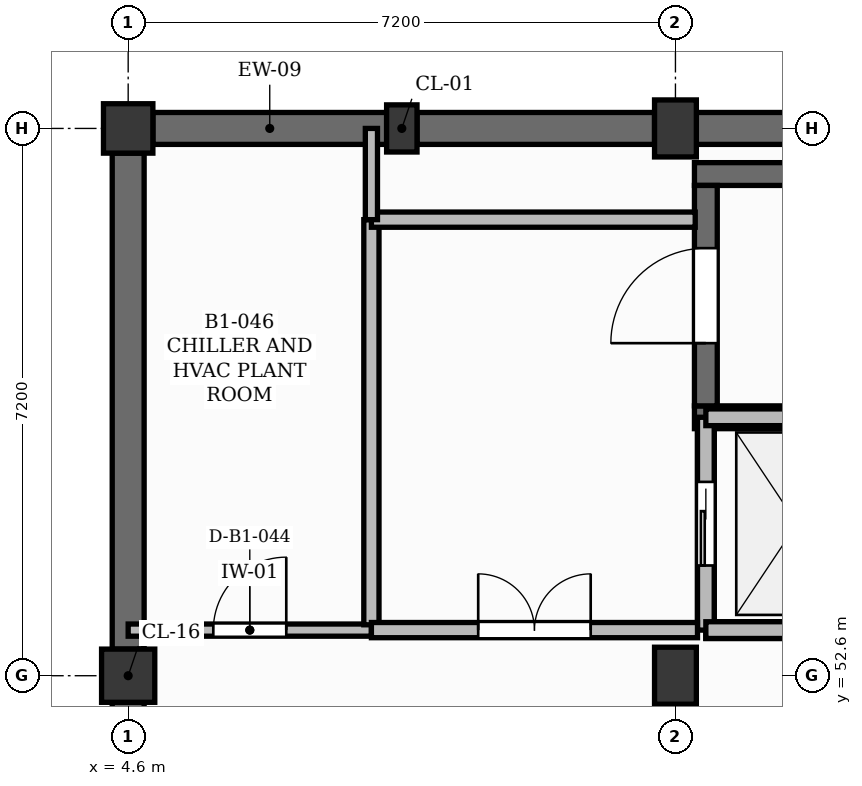
"""IFC4 building model, lengths in metres.
Left out: names, types, materials, properties, quantities, classifications, styles, units other than length and angle.
Written with IfcOpenShell. Run it as: python <this file> out.ifc"""

import sys

from ifc_helpers import new_model, si_unit, direction, frame, frame_2d, origin, origin_2d, place, context, subcontext, project, spatial, rectangle, extrude, element, fill, save


model = new_model("IFC4")
c1 = context("Model", 3, precision=1e-05, world=origin(), true_north=direction((0.0, 1.0)))
c2 = subcontext(c1, "Body", "Model", "MODEL_VIEW")
j1 = project(units=[si_unit("LENGTHUNIT", "METRE"), si_unit("PLANEANGLEUNIT", "RADIAN")], contexts=[c1])
p1 = place(None, origin())
s1 = spatial("IfcSite", under=j1, at=p1, CompositionType="ELEMENT")
p2 = place(p1, origin())
s2 = spatial("IfcBuilding", under=s1, at=p2, CompositionType="ELEMENT")
p3 = place(p2, frame((0.0, 0.0, -4.5)))
s3 = spatial("IfcBuildingStorey", under=s2, at=p3, CompositionType="ELEMENT", Elevation=-4.5)
p4 = place(p3, frame((4.6, 52.6, 0.0), z_axis=(0.0, 0.0, 1.0), x_axis=(1.0, 0.0, 0.0)))
e1 = element("IfcColumn", 1, at=p4, inside=s3, PredefinedType="COLUMN", context=c2, shape_type="SweptSolid", body=[
    extrude(rectangle(XDim=0.7, YDim=0.7, at=origin_2d()), origin(), (0.0, 0.0, 1.0), 4.2),
])
p5 = place(p3, frame((4.6, 59.8, 0.0), z_axis=(0.0, 0.0, 1.0), x_axis=(1.0, 0.0, 0.0)))
e2 = element("IfcColumn", 2, at=p5, inside=s3, PredefinedType="COLUMN", context=c2, shape_type="SweptSolid", body=[
    extrude(rectangle(XDim=0.65, YDim=0.65, at=origin_2d()), origin(), (0.0, 0.0, 1.0), 4.2),
])
for number, where, z_axis, x_axis in (
    (3, (11.8, 52.6, 0.0), (0.0, 0.0, 1.0), (1.0, 0.0, 0.0)),
    (4, (11.8, 59.8, 0.0), (0.0, 0.0, 1.0), (1.0, 0.0, 0.0)),
):
    element("IfcColumn", number, at=place(p3, frame(where, z_axis=z_axis, x_axis=x_axis)), inside=s3, PredefinedType="COLUMN", context=c2, shape_type="SweptSolid", body=[
        extrude(rectangle(XDim=0.55, YDim=0.75, at=origin_2d()), origin(), (0.0, 0.0, 1.0), 4.2),
    ])
p6 = place(p3, frame((8.2, 59.8, 0.0), z_axis=(0.0, 0.0, 1.0), x_axis=(1.0, 0.0, 0.0)))
e5 = element("IfcColumn", 5, at=p6, inside=s3, PredefinedType="PILASTER", context=c2, shape_type="SweptSolid", body=[
    extrude(rectangle(XDim=0.4, YDim=0.62, at=origin_2d()), origin(), (0.0, 0.0, 1.0), 4.2),
])
p7 = place(p3, frame((4.6, 45.725, 0.0), z_axis=(0.0, 0.0, 1.0), x_axis=(0.0, 1.0, 0.0)))
e6 = element("IfcWall", 6, at=p7, inside=s3, PredefinedType="USERDEFINED", context=c2, shape_type="SweptSolid", body=[
    extrude(rectangle(XDim=6.525, YDim=0.42, at=frame_2d((3.262, 0.0))), origin(), (0.0, 0.0, 1.0), 4.2),
])
p8 = place(p3, frame((4.925, 59.8, 0.0), z_axis=(0.0, 0.0, 1.0), x_axis=(1.0, 0.0, 0.0)))
e7 = element("IfcWall", 7, at=p8, inside=s3, PredefinedType="USERDEFINED", context=c2, shape_type="SweptSolid", body=[
    extrude(rectangle(XDim=3.075, YDim=0.42, at=frame_2d((1.538, 0.0))), origin(), (0.0, 0.0, 1.0), 4.2),
])
p9 = place(p3, frame((8.4, 59.8, 0.0), z_axis=(0.0, 0.0, 1.0), x_axis=(1.0, 0.0, 0.0)))
e8 = element("IfcWall", 8, at=p9, inside=s3, PredefinedType="USERDEFINED", context=c2, shape_type="SweptSolid", body=[
    extrude(rectangle(XDim=3.125, YDim=0.42, at=frame_2d((1.562, 0.0))), origin(), (0.0, 0.0, 1.0), 4.2),
])
p10 = place(p3, frame((4.6, 52.95, 0.0), z_axis=(0.0, 0.0, 1.0), x_axis=(0.0, 1.0, 0.0)))
e9 = element("IfcWall", 9, at=p10, inside=s3, PredefinedType="USERDEFINED", context=c2, shape_type="SweptSolid", body=[
    extrude(rectangle(XDim=6.525, YDim=0.42, at=frame_2d((3.263, 0.0))), origin(), (0.0, 0.0, 1.0), 4.2),
])
p11 = place(p3, frame((12.075, 59.8, 0.0), z_axis=(0.0, 0.0, 1.0), x_axis=(1.0, 0.0, 0.0)))
e10 = element("IfcWall", 10, at=p11, inside=s3, PredefinedType="USERDEFINED", context=c2, shape_type="SweptSolid", body=[
    extrude(rectangle(XDim=6.575, YDim=0.42, at=frame_2d((3.288, 0.0))), origin(), (0.0, 0.0, 1.0), 4.2),
])
for number, where, z_axis, x_axis in (
    (11, (12.05, 56.0, 0.0), (0.0, 0.0, 1.0), (1.0, 0.0, 0.0)),
    (12, (12.05, 59.2, 0.0), (0.0, 0.0, 1.0), (1.0, 0.0, 0.0)),
):
    element("IfcWall", number, at=place(p3, frame(where, z_axis=z_axis, x_axis=x_axis)), inside=s3, PredefinedType="SHEAR", context=c2, shape_type="SweptSolid", body=[
        extrude(rectangle(XDim=6.7, YDim=0.3, at=frame_2d((3.35, 0.0))), origin(), (0.0, 0.0, 1.0), 4.25),
    ])
p12 = place(p3, frame((12.2, 56.15, 0.0), z_axis=(0.0, 0.0, 1.0), x_axis=(0.0, 1.0, 0.0)))
e13 = element("IfcWall", 13, at=p12, inside=s3, PredefinedType="SHEAR", context=c2, shape_type="SweptSolid", body=[
    extrude(rectangle(XDim=2.9, YDim=0.3, at=frame_2d((1.45, 0.0))), origin(), (0.0, 0.0, 1.0), 4.25),
])
p13 = place(p12, frame((0.825, 0.0, 0.0)))
e14 = element("IfcOpeningElement", 14, at=p13, cuts=e13, PredefinedType="OPENING", context=c2, shape_type="SweptSolid", body=[
    extrude(rectangle(XDim=1.25, YDim=2.15, at=frame_2d((0.625, 1.075))), frame((0.0, 0.16, 0.0), z_axis=(0.0, -1.0, 0.0), x_axis=(1.0, 0.0, 0.0)), (0.0, 0.0, 1.0), 0.32),
])
p14 = place(p3, frame((12.2, 53.2, 0.0), z_axis=(0.0, 0.0, 1.0), x_axis=(1.0, 0.0, 0.0)))
e15 = element("IfcWall", 15, at=p14, inside=s3, PredefinedType="SOLIDWALL", context=c2, shape_type="SweptSolid", body=[
    extrude(rectangle(XDim=2.4, YDim=0.22, at=frame_2d((1.2, 0.0))), origin(), (0.0, 0.0, 1.0), 4.25),
])
p15 = place(p3, frame((12.2, 53.31, 0.0), z_axis=(0.0, 0.0, 1.0), x_axis=(0.0, 1.0, 0.0)))
e16 = element("IfcWall", 16, at=p15, inside=s3, PredefinedType="SOLIDWALL", context=c2, shape_type="SweptSolid", body=[
    extrude(rectangle(XDim=2.58, YDim=0.22, at=frame_2d((1.29, 0.0))), origin(), (0.0, 0.0, 1.0), 4.25),
])
p16 = place(p15, frame((0.74, 0.0, 0.0)))
e17 = element("IfcOpeningElement", 17, at=p16, cuts=e16, PredefinedType="OPENING", context=c2, shape_type="SweptSolid", body=[
    extrude(rectangle(XDim=1.1, YDim=2.15, at=frame_2d((0.55, 1.075))), frame((0.0, 0.12, 0.0), z_axis=(0.0, -1.0, 0.0), x_axis=(1.0, 0.0, 0.0)), (0.0, 0.0, 1.0), 0.24),
])
p17 = place(p3, frame((12.2, 53.2, -0.9), z_axis=(0.0, 0.0, 1.0), x_axis=(0.0, 1.0, 0.0)))
e18 = element("IfcWall", 18, at=p17, inside=s3, PredefinedType="SOLIDWALL", context=c2, shape_type="SweptSolid", body=[
    extrude(rectangle(XDim=2.8, YDim=0.22, at=frame_2d((1.4, 0.0))), origin(), (0.0, 0.0, 1.0), 0.9),
])
for number, where, z_axis, x_axis in (
    (19, (12.2, 53.2, -0.9), (0.0, 0.0, 1.0), (1.0, 0.0, 0.0)),
    (20, (12.2, 56.0, -0.9), (0.0, 0.0, 1.0), (1.0, 0.0, 0.0)),
):
    element("IfcWall", number, at=place(p3, frame(where, z_axis=z_axis, x_axis=x_axis)), inside=s3, PredefinedType="SOLIDWALL", context=c2, shape_type="SweptSolid", body=[
        extrude(rectangle(XDim=2.4, YDim=0.22, at=frame_2d((1.2, 0.0))), origin(), (0.0, 0.0, 1.0), 0.9),
    ])
p18 = place(p3, frame((4.6, 53.2, 0.0), z_axis=(0.0, 0.0, 1.0), x_axis=(1.0, 0.0, 0.0)))
e21 = element("IfcWall", 21, at=p18, inside=s3, PredefinedType="PARTITIONING", context=c2, shape_type="SweptSolid", body=[
    extrude(rectangle(XDim=3.2, YDim=0.16, at=frame_2d((1.6, 0.0))), origin(), (0.0, 0.0, 1.0), 4.08),
])
p19 = place(p18, frame((1.12, 0.0, 0.0)))
e22 = element("IfcOpeningElement", 22, at=p19, cuts=e21, PredefinedType="OPENING", context=c2, shape_type="SweptSolid", body=[
    extrude(rectangle(XDim=0.96, YDim=2.1, at=frame_2d((0.48, 1.05))), frame((0.0, 0.09, 0.0), z_axis=(0.0, -1.0, 0.0), x_axis=(1.0, 0.0, 0.0)), (0.0, 0.0, 1.0), 0.18),
])
p20 = place(p3, frame((7.8, 53.27, 0.0), z_axis=(0.0, 0.0, 1.0), x_axis=(0.0, 1.0, 0.0)))
e23 = element("IfcWall", 23, at=p20, inside=s3, PredefinedType="PARTITIONING", context=c2, shape_type="SweptSolid", body=[
    extrude(rectangle(XDim=5.33, YDim=0.2, at=frame_2d((2.665, 0.0))), origin(), (0.0, 0.0, 1.0), 4.08),
])
p21 = place(p3, frame((7.8, 53.2, 0.0), z_axis=(0.0, 0.0, 1.0), x_axis=(1.0, 0.0, 0.0)))
e24 = element("IfcWall", 24, at=p21, inside=s3, PredefinedType="PARTITIONING", context=c2, shape_type="SweptSolid", body=[
    extrude(rectangle(XDim=4.29, YDim=0.2, at=frame_2d((2.145, 0.0))), origin(), (0.0, 0.0, 1.0), 4.08),
])
p22 = place(p21, frame((1.405, 0.0, 0.0)))
e25 = element("IfcOpeningElement", 25, at=p22, cuts=e24, PredefinedType="OPENING", context=c2, shape_type="SweptSolid", body=[
    extrude(rectangle(XDim=1.48, YDim=2.25, at=frame_2d((0.74, 1.125))), frame((0.0, 0.11, 0.0), z_axis=(0.0, -1.0, 0.0), x_axis=(1.0, 0.0, 0.0)), (0.0, 0.0, 1.0), 0.22),
])
p23 = place(p3, frame((12.06, 58.6, 0.0), z_axis=(0.0, 0.0, 1.0), x_axis=(-1.0, 0.0, 0.0)))
e26 = element("IfcWall", 26, at=p23, inside=s3, PredefinedType="PARTITIONING", context=c2, shape_type="SweptSolid", body=[
    extrude(rectangle(XDim=4.26, YDim=0.2, at=frame_2d((2.13, 0.0))), origin(), (0.0, 0.0, 1.0), 4.08),
])
p24 = place(p3, frame((7.8, 58.6, 0.0), z_axis=(0.0, 0.0, 1.0), x_axis=(0.0, 1.0, 0.0)))
e27 = element("IfcWall", 27, at=p24, inside=s3, PredefinedType="PARTITIONING", context=c2, shape_type="SweptSolid", body=[
    extrude(rectangle(XDim=1.2, YDim=0.16, at=frame_2d((0.6, 0.0))), origin(), (0.0, 0.0, 1.0), 4.08),
])
p25 = place(p16, origin())
e28 = element("IfcDoor", 28, at=p25, inside=s3, OperationType="SLIDING_TO_LEFT", PredefinedType="DOOR", context=c2, shape_type="SweptSolid", body=[
    extrude(rectangle(XDim=1.1, YDim=2.15, at=frame_2d((0.55, 1.075))), frame((0.0, 0.025, 0.0), z_axis=(0.0, -1.0, 0.0), x_axis=(1.0, 0.0, 0.0)), (0.0, 0.0, 1.0), 0.05),
])
fill(e17, e28)
p26 = place(p13, origin())
e29 = element("IfcDoor", 29, at=p26, inside=s3, OperationType="SINGLE_SWING_LEFT", PredefinedType="DOOR", context=c2, shape_type="SweptSolid", body=[
    extrude(rectangle(XDim=1.25, YDim=2.15, at=frame_2d((0.625, 1.075))), frame((0.0, 0.025, 0.0), z_axis=(0.0, -1.0, 0.0), x_axis=(1.0, 0.0, 0.0)), (0.0, 0.0, 1.0), 0.05),
])
fill(e14, e29)
p27 = place(p22, origin())
e30 = element("IfcDoor", 30, at=p27, inside=s3, OperationType="DOUBLE_DOOR_SINGLE_SWING", PredefinedType="DOOR", context=c2, shape_type="SweptSolid", body=[
    extrude(rectangle(XDim=1.48, YDim=2.25, at=frame_2d((0.74, 1.125))), frame((0.0, 0.025, 0.0), z_axis=(0.0, -1.0, 0.0), x_axis=(1.0, 0.0, 0.0)), (0.0, 0.0, 1.0), 0.05),
])
fill(e25, e30)
p28 = place(p19, origin())
e31 = element("IfcDoor", 31, at=p28, inside=s3, OperationType="SINGLE_SWING_RIGHT", PredefinedType="DOOR", context=c2, shape_type="SweptSolid", body=[
    extrude(rectangle(XDim=0.96, YDim=2.1, at=frame_2d((0.48, 1.05))), frame((0.0, 0.025, 0.0), z_axis=(0.0, -1.0, 0.0), x_axis=(1.0, 0.0, 0.0)), (0.0, 0.0, 1.0), 0.05),
])
fill(e22, e31)
save(model, sys.argv[1])
